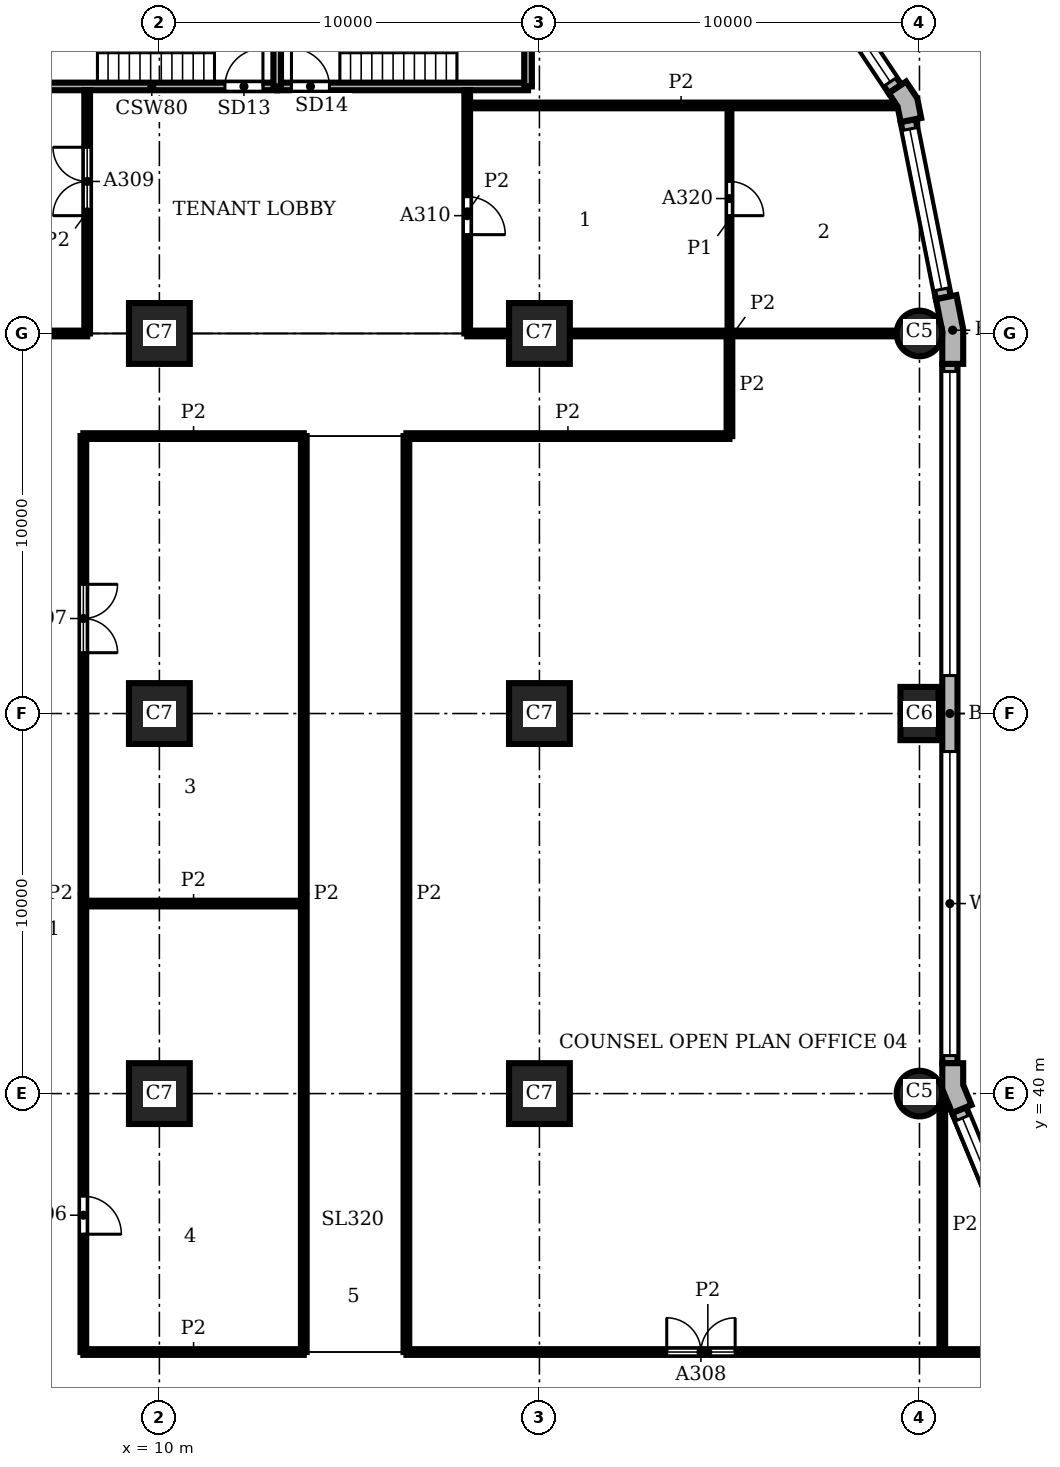
"""IFC4 building model, lengths in metres.
Left out: names, types, materials, properties, quantities, classifications, styles, units other than length and angle.
Written with IfcOpenShell. Run it as: python <this file> out.ifc"""

import sys

from ifc_helpers import new_model, si_unit, direction, frame, frame_2d, origin, origin_2d, place, context, subcontext, project, spatial, polyline, rectangle, circle, outline, extrude, element, fill, save


model = new_model("IFC4")
c1 = context("Model", 3, precision=1e-05, world=origin(), true_north=direction((0.0, 1.0)))
c2 = subcontext(c1, "Body", "Model", "MODEL_VIEW")
j1 = project(units=[si_unit("LENGTHUNIT", "METRE"), si_unit("PLANEANGLEUNIT", "RADIAN")], contexts=[c1])
p1 = place(None, origin())
s1 = spatial("IfcSite", under=j1, at=p1, CompositionType="ELEMENT")
p2 = place(p1, origin())
s2 = spatial("IfcBuilding", under=s1, at=p2, CompositionType="ELEMENT")
p3 = place(p2, frame((0.0, 0.0, 35.4)))
s3 = spatial("IfcBuildingStorey", under=s2, at=p3, CompositionType="ELEMENT", Elevation=35.4)
p4 = place(p3, frame((30.0, 40.0, 0.0), z_axis=(0.0, 0.0, 1.0), x_axis=(1.0, 0.0, 0.0)))
e1 = element("IfcColumn", 1, at=p4, inside=s3, PredefinedType="COLUMN", context=c2, shape_type="SweptSolid", body=[
    extrude(circle(Radius=0.6, at=origin_2d()), origin(), (0.0, 0.0, 1.0), 3.9),
])
p5 = place(p3, frame((30.0, 50.0, 0.0), z_axis=(0.0, 0.0, 1.0), x_axis=(0.0, 1.0, 0.0)))
e2 = element("IfcColumn", 2, at=p5, inside=s3, PredefinedType="COLUMN", context=c2, shape_type="SweptSolid", body=[
    extrude(rectangle(XDim=1.4, YDim=1.0, at=origin_2d()), origin(), (0.0, 0.0, 1.0), 3.9),
])
p6 = place(p3, frame((30.0, 60.0, 0.0), z_axis=(0.0, 0.0, 1.0), x_axis=(1.0, 0.0, 0.0)))
e3 = element("IfcColumn", 3, at=p6, inside=s3, PredefinedType="COLUMN", context=c2, shape_type="SweptSolid", body=[
    extrude(circle(Radius=0.6, at=origin_2d()), origin(), (0.0, 0.0, 1.0), 3.9),
])
for number, where, z_axis, x_axis in (
    (4, (10.0, 40.0, 0.0), (0.0, 0.0, 1.0), (1.0, 0.0, 0.0)),
    (5, (10.0, 50.0, 0.0), (0.0, 0.0, 1.0), (1.0, 0.0, 0.0)),
    (6, (10.0, 60.0, 0.0), (0.0, 0.0, 1.0), (1.0, 0.0, 0.0)),
    (7, (20.0, 40.0, 0.0), (0.0, 0.0, 1.0), (1.0, 0.0, 0.0)),
    (8, (20.0, 50.0, 0.0), (0.0, 0.0, 1.0), (1.0, 0.0, 0.0)),
    (9, (20.0, 60.0, 0.0), (0.0, 0.0, 1.0), (1.0, 0.0, 0.0)),
):
    element("IfcColumn", number, at=place(p3, frame(where, z_axis=z_axis, x_axis=x_axis)), inside=s3, PredefinedType="COLUMN", context=c2, shape_type="SweptSolid", body=[
        extrude(rectangle(XDim=1.6, YDim=1.6, at=origin_2d()), origin(), (0.0, 0.0, 1.0), 3.9),
    ])
p7 = place(p3, origin())
e10 = element("IfcWall", 10, at=p7, inside=s3, PredefinedType="SOLIDWALL", context=c2, shape_type="SweptSolid", body=[
    extrude(outline(polyline([(31.23, 39.644), (31.369, 39.701), (31.15, 40.229), (31.15, 40.8), (31.0, 40.8), (30.6, 40.8), (30.6, 40.119), (30.861, 39.49), (31.23, 39.644)])), origin(), (0.0, 0.0, 1.0), 3.9),
])
e11 = element("IfcWall", 11, at=p7, inside=s3, PredefinedType="SOLIDWALL", context=c2, shape_type="SweptSolid", body=[
    extrude(outline(polyline([(31.0, 59.2), (31.15, 59.2), (31.15, 60.113), (30.972, 61.009), (30.825, 60.98), (30.432, 60.902), (30.6, 60.059), (30.6, 59.2), (31.0, 59.2)])), origin(), (0.0, 0.0, 1.0), 3.9),
])
e12 = element("IfcWall", 12, at=p7, inside=s3, PredefinedType="SOLIDWALL", context=c2, shape_type="SweptSolid", body=[
    extrude(outline(polyline([(29.897, 65.641), (30.045, 65.67), (29.941, 66.189), (29.648, 66.629), (29.523, 66.545), (29.19, 66.323), (29.423, 65.974), (29.505, 65.563), (29.897, 65.641)])), origin(), (0.0, 0.0, 1.0), 3.9),
])
p8 = place(p3, frame((33.362, 33.974, 0.0), z_axis=(0.0, 0.0, 1.0), x_axis=(-0.382655745237, 0.923891000409, 0.0)))
e13 = element("IfcWall", 13, at=p8, inside=s3, PredefinedType="SOLIDWALL", context=c2, shape_type="SweptSolid", body=[
    extrude(rectangle(XDim=6.053, YDim=0.4, at=frame_2d((3.027, 0.0))), origin(), (0.0, 0.0, 1.0), 3.9),
])
p9 = place(p8, frame((0.227, 0.0, 0.9)))
e14 = element("IfcOpeningElement", 14, at=p9, cuts=e13, PredefinedType="OPENING", context=c2, shape_type="SweptSolid", body=[
    extrude(rectangle(XDim=5.6, YDim=2.35, at=frame_2d((2.8, 1.175))), frame((0.0, 0.21, 0.0), z_axis=(0.0, -1.0, 0.0), x_axis=(1.0, 0.0, 0.0)), (0.0, 0.0, 1.0), 0.42),
])
p10 = place(p3, frame((30.8, 40.8, 0.0), z_axis=(0.0, 0.0, 1.0), x_axis=(0.0, 1.0, 0.0)))
e15 = element("IfcWall", 15, at=p10, inside=s3, PredefinedType="SOLIDWALL", context=c2, shape_type="SweptSolid", body=[
    extrude(rectangle(XDim=18.4, YDim=0.4, at=frame_2d((9.2, 0.0))), origin(), (0.0, 0.0, 1.0), 3.9),
])
p11 = place(p10, frame((0.2, 0.0, 0.9)))
e16 = element("IfcOpeningElement", 16, at=p11, cuts=e15, PredefinedType="OPENING", context=c2, shape_type="SweptSolid", body=[
    extrude(rectangle(XDim=8.0, YDim=2.35, at=frame_2d((4.0, 1.175))), frame((0.0, 0.21, 0.0), z_axis=(0.0, -1.0, 0.0), x_axis=(1.0, 0.0, 0.0)), (0.0, 0.0, 1.0), 0.42),
])
p12 = place(p10, frame((10.2, 0.0, 0.9)))
e17 = element("IfcOpeningElement", 17, at=p12, cuts=e15, PredefinedType="OPENING", context=c2, shape_type="SweptSolid", body=[
    extrude(rectangle(XDim=8.0, YDim=2.35, at=frame_2d((4.0, 1.175))), frame((0.0, 0.21, 0.0), z_axis=(0.0, -1.0, 0.0), x_axis=(1.0, 0.0, 0.0)), (0.0, 0.0, 1.0), 0.42),
])
p13 = place(p3, frame((30.629, 60.941, 0.0), z_axis=(0.0, 0.0, 1.0), x_axis=(-0.195098533057, 0.98078364709, 0.0)))
e18 = element("IfcWall", 18, at=p13, inside=s3, PredefinedType="SOLIDWALL", context=c2, shape_type="SweptSolid", body=[
    extrude(rectangle(XDim=4.753, YDim=0.4, at=frame_2d((2.376, 0.0))), origin(), (0.0, 0.0, 1.0), 3.9),
])
p14 = place(p13, frame((0.226, 0.0, 0.9)))
e19 = element("IfcOpeningElement", 19, at=p14, cuts=e18, PredefinedType="OPENING", context=c2, shape_type="SweptSolid", body=[
    extrude(rectangle(XDim=4.3, YDim=2.35, at=frame_2d((2.15, 1.175))), frame((0.0, 0.21, 0.0), z_axis=(0.0, -1.0, 0.0), x_axis=(1.0, 0.0, 0.0)), (0.0, 0.0, 1.0), 0.42),
])
p15 = place(p3, frame((29.357, 66.434, 0.0), z_axis=(0.0, 0.0, 1.0), x_axis=(-0.555541552266, 0.831488775454, 0.0)))
e20 = element("IfcWall", 20, at=p15, inside=s3, PredefinedType="SOLIDWALL", context=c2, shape_type="SweptSolid", body=[
    extrude(rectangle(XDim=4.753, YDim=0.4, at=frame_2d((2.376, 0.0))), origin(), (0.0, 0.0, 1.0), 3.9),
])
p16 = place(p15, frame((0.226, 0.0, 0.9)))
e21 = element("IfcOpeningElement", 21, at=p16, cuts=e20, PredefinedType="OPENING", context=c2, shape_type="SweptSolid", body=[
    extrude(rectangle(XDim=4.3, YDim=2.35, at=frame_2d((2.15, 1.175))), frame((0.0, 0.21, 0.0), z_axis=(0.0, -1.0, 0.0), x_axis=(1.0, 0.0, 0.0)), (0.0, 0.0, 1.0), 0.42),
])
p17 = place(p3, frame((6.5, 66.5, 0.0), z_axis=(0.0, 0.0, 1.0), x_axis=(1.0, 0.0, 0.0)))
e22 = element("IfcWall", 22, at=p17, inside=s3, PredefinedType="SHEAR", context=c2, shape_type="SweptSolid", body=[
    extrude(rectangle(XDim=6.6, YDim=0.2, at=frame_2d((3.3, 0.0))), origin(), (0.0, 0.0, 1.0), 3.58),
])
p18 = place(p17, frame((5.225, 0.0, 0.0)))
e23 = element("IfcOpeningElement", 23, at=p18, cuts=e22, PredefinedType="OPENING", context=c2, shape_type="SweptSolid", body=[
    extrude(rectangle(XDim=1.0, YDim=2.1, at=frame_2d((0.5, 1.05))), frame((0.0, 0.11, 0.0), z_axis=(0.0, -1.0, 0.0), x_axis=(1.0, 0.0, 0.0)), (0.0, 0.0, 1.0), 0.22),
])
p19 = place(p3, frame((13.1, 66.5, 0.0), z_axis=(0.0, 0.0, 1.0), x_axis=(1.0, 0.0, 0.0)))
e24 = element("IfcWall", 24, at=p19, inside=s3, PredefinedType="SHEAR", context=c2, shape_type="SweptSolid", body=[
    extrude(rectangle(XDim=6.6, YDim=0.2, at=frame_2d((3.3, 0.0))), origin(), (0.0, 0.0, 1.0), 3.58),
])
p20 = place(p19, frame((0.375, 0.0, 0.0)))
e25 = element("IfcOpeningElement", 25, at=p20, cuts=e24, PredefinedType="OPENING", context=c2, shape_type="SweptSolid", body=[
    extrude(rectangle(XDim=1.0, YDim=2.1, at=frame_2d((0.5, 1.05))), frame((0.0, 0.11, 0.0), z_axis=(0.0, -1.0, 0.0), x_axis=(1.0, 0.0, 0.0)), (0.0, 0.0, 1.0), 0.22),
])
for number, where, z_axis, x_axis in (
    (26, (13.1, 66.5, 0.0), (0.0, 0.0, 1.0), (0.0, 1.0, 0.0)),
    (27, (19.7, 66.5, 0.0), (0.0, 0.0, 1.0), (0.0, 1.0, 0.0)),
):
    element("IfcWall", number, at=place(p3, frame(where, z_axis=z_axis, x_axis=x_axis)), inside=s3, PredefinedType="SHEAR", context=c2, shape_type="SweptSolid", body=[
        extrude(rectangle(XDim=3.3, YDim=0.2, at=frame_2d((1.65, 0.0))), origin(), (0.0, 0.0, 1.0), 3.58),
    ])
p21 = place(p3, frame((25.0, 60.0, 0.0), z_axis=(0.0, 0.0, 1.0), x_axis=(0.0, 1.0, 0.0)))
e28 = element("IfcWall", 28, at=p21, inside=s3, PredefinedType="PARTITIONING", context=c2, shape_type="SweptSolid", body=[
    extrude(rectangle(XDim=6.0, YDim=0.1, at=frame_2d((3.0, 0.0))), origin(), (0.0, 0.0, 1.0), 3.58),
])
p22 = place(p21, frame((3.1, 0.0, 0.0)))
e29 = element("IfcOpeningElement", 29, at=p22, cuts=e28, PredefinedType="OPENING", context=c2, shape_type="SweptSolid", body=[
    extrude(rectangle(XDim=0.9, YDim=2.1, at=frame_2d((0.45, 1.05))), frame((0.0, 0.06, 0.0), z_axis=(0.0, -1.0, 0.0), x_axis=(1.0, 0.0, 0.0)), (0.0, 0.0, 1.0), 0.12),
])
p23 = place(p3, frame((8.0, 33.2, 0.0), z_axis=(0.0, 0.0, 1.0), x_axis=(0.0, 1.0, 0.0)))
e30 = element("IfcWall", 30, at=p23, inside=s3, PredefinedType="PARTITIONING", context=c2, shape_type="SweptSolid", body=[
    extrude(rectangle(XDim=24.1, YDim=0.15, at=frame_2d((12.05, 0.0))), origin(), (0.0, 0.0, 1.0), 3.58),
])
p24 = place(p23, frame((3.1, 0.0, 0.0)))
e31 = element("IfcOpeningElement", 31, at=p24, cuts=e30, PredefinedType="OPENING", context=c2, shape_type="SweptSolid", body=[
    extrude(rectangle(XDim=1.0, YDim=2.1, at=frame_2d((0.5, 1.05))), frame((0.0, 0.085, 0.0), z_axis=(0.0, -1.0, 0.0), x_axis=(1.0, 0.0, 0.0)), (0.0, 0.0, 1.0), 0.17),
])
p25 = place(p23, frame((18.4, 0.0, 0.0)))
e32 = element("IfcOpeningElement", 32, at=p25, cuts=e30, PredefinedType="OPENING", context=c2, shape_type="SweptSolid", body=[
    extrude(rectangle(XDim=1.8, YDim=2.1, at=frame_2d((0.9, 1.05))), frame((0.0, 0.085, 0.0), z_axis=(0.0, -1.0, 0.0), x_axis=(1.0, 0.0, 0.0)), (0.0, 0.0, 1.0), 0.17),
])
p26 = place(p3, frame((8.1, 60.0, 0.0), z_axis=(0.0, 0.0, 1.0), x_axis=(0.0, 1.0, 0.0)))
e33 = element("IfcWall", 33, at=p26, inside=s3, PredefinedType="PARTITIONING", context=c2, shape_type="SweptSolid", body=[
    extrude(rectangle(XDim=6.4, YDim=0.15, at=frame_2d((3.2, 0.0))), origin(), (0.0, 0.0, 1.0), 3.58),
])
p27 = place(p26, frame((3.1, 0.0, 0.0)))
e34 = element("IfcOpeningElement", 34, at=p27, cuts=e33, PredefinedType="OPENING", context=c2, shape_type="SweptSolid", body=[
    extrude(rectangle(XDim=1.8, YDim=2.1, at=frame_2d((0.9, 1.05))), frame((0.0, 0.085, 0.0), z_axis=(0.0, -1.0, 0.0), x_axis=(1.0, 0.0, 0.0)), (0.0, 0.0, 1.0), 0.17),
])
for number, where, z_axis, x_axis in (
    (35, (13.8, 33.2, 0.0), (0.0, 0.0, 1.0), (0.0, 1.0, 0.0)),
    (36, (16.5, 33.2, 0.0), (0.0, 0.0, 1.0), (0.0, 1.0, 0.0)),
):
    element("IfcWall", number, at=place(p3, frame(where, z_axis=z_axis, x_axis=x_axis)), inside=s3, PredefinedType="PARTITIONING", context=c2, shape_type="SweptSolid", body=[
        extrude(rectangle(XDim=24.1, YDim=0.15, at=frame_2d((12.05, 0.0))), origin(), (0.0, 0.0, 1.0), 3.58),
    ])
p28 = place(p3, frame((18.1, 60.0, 0.0), z_axis=(0.0, 0.0, 1.0), x_axis=(0.0, 1.0, 0.0)))
e37 = element("IfcWall", 37, at=p28, inside=s3, PredefinedType="PARTITIONING", context=c2, shape_type="SweptSolid", body=[
    extrude(rectangle(XDim=6.4, YDim=0.15, at=frame_2d((3.2, 0.0))), origin(), (0.0, 0.0, 1.0), 3.58),
])
p29 = place(p28, frame((2.6, 0.0, 0.0)))
e38 = element("IfcOpeningElement", 38, at=p29, cuts=e37, PredefinedType="OPENING", context=c2, shape_type="SweptSolid", body=[
    extrude(rectangle(XDim=1.0, YDim=2.1, at=frame_2d((0.5, 1.05))), frame((0.0, 0.085, 0.0), z_axis=(0.0, -1.0, 0.0), x_axis=(1.0, 0.0, 0.0)), (0.0, 0.0, 1.0), 0.17),
])
p30 = place(p3, frame((25.0, 57.3, 0.0), z_axis=(0.0, 0.0, 1.0), x_axis=(0.0, 1.0, 0.0)))
e39 = element("IfcWall", 39, at=p30, inside=s3, PredefinedType="PARTITIONING", context=c2, shape_type="SweptSolid", body=[
    extrude(rectangle(XDim=2.7, YDim=0.15, at=frame_2d((1.35, 0.0))), origin(), (0.0, 0.0, 1.0), 3.58),
])
p31 = place(p3, frame((30.6, 33.2, 0.0), z_axis=(0.0, 0.0, 1.0), x_axis=(0.0, 1.0, 0.0)))
e40 = element("IfcWall", 40, at=p31, inside=s3, PredefinedType="PARTITIONING", context=c2, shape_type="SweptSolid", body=[
    extrude(rectangle(XDim=6.699, YDim=0.15, at=frame_2d((3.35, 0.0))), origin(), (0.0, 0.0, 1.0), 3.58),
])
p32 = place(p3, frame((8.0, 33.2, 0.0), z_axis=(0.0, 0.0, 1.0), x_axis=(1.0, 0.0, 0.0)))
e41 = element("IfcWall", 41, at=p32, inside=s3, PredefinedType="PARTITIONING", context=c2, shape_type="SweptSolid", body=[
    extrude(rectangle(XDim=5.8, YDim=0.15, at=frame_2d((2.9, 0.0))), origin(), (0.0, 0.0, 1.0), 3.58),
])
p33 = place(p3, frame((16.5, 33.2, 0.0), z_axis=(0.0, 0.0, 1.0), x_axis=(1.0, 0.0, 0.0)))
e42 = element("IfcWall", 42, at=p33, inside=s3, PredefinedType="PARTITIONING", context=c2, shape_type="SweptSolid", body=[
    extrude(rectangle(XDim=15.862, YDim=0.15, at=frame_2d((7.931, 0.0))), origin(), (0.0, 0.0, 1.0), 3.58),
])
p34 = place(p33, frame((6.85, 0.0, 0.0)))
e43 = element("IfcOpeningElement", 43, at=p34, cuts=e42, PredefinedType="OPENING", context=c2, shape_type="SweptSolid", body=[
    extrude(rectangle(XDim=1.8, YDim=2.1, at=frame_2d((0.9, 1.05))), frame((0.0, 0.085, 0.0), z_axis=(0.0, -1.0, 0.0), x_axis=(1.0, 0.0, 0.0)), (0.0, 0.0, 1.0), 0.17),
])
for number, where, z_axis, x_axis in (
    (44, (8.0, 45.0, 0.0), (0.0, 0.0, 1.0), (1.0, 0.0, 0.0)),
    (45, (8.0, 57.3, 0.0), (0.0, 0.0, 1.0), (1.0, 0.0, 0.0)),
):
    element("IfcWall", number, at=place(p3, frame(where, z_axis=z_axis, x_axis=x_axis)), inside=s3, PredefinedType="PARTITIONING", context=c2, shape_type="SweptSolid", body=[
        extrude(rectangle(XDim=5.8, YDim=0.15, at=frame_2d((2.9, 0.0))), origin(), (0.0, 0.0, 1.0), 3.58),
    ])
p35 = place(p3, frame((16.5, 57.3, 0.0), z_axis=(0.0, 0.0, 1.0), x_axis=(1.0, 0.0, 0.0)))
e46 = element("IfcWall", 46, at=p35, inside=s3, PredefinedType="PARTITIONING", context=c2, shape_type="SweptSolid", body=[
    extrude(rectangle(XDim=8.5, YDim=0.15, at=frame_2d((4.25, 0.0))), origin(), (0.0, 0.0, 1.0), 3.58),
])
p36 = place(p3, frame((0.6, 60.0, 0.0), z_axis=(0.0, 0.0, 1.0), x_axis=(1.0, 0.0, 0.0)))
e47 = element("IfcWall", 47, at=p36, inside=s3, PredefinedType="PARTITIONING", context=c2, shape_type="SweptSolid", body=[
    extrude(rectangle(XDim=7.5, YDim=0.15, at=frame_2d((3.75, 0.0))), origin(), (0.0, 0.0, 1.0), 3.58),
])
p37 = place(p3, frame((18.1, 60.0, 0.0), z_axis=(0.0, 0.0, 1.0), x_axis=(1.0, 0.0, 0.0)))
e48 = element("IfcWall", 48, at=p37, inside=s3, PredefinedType="PARTITIONING", context=c2, shape_type="SweptSolid", body=[
    extrude(rectangle(XDim=1.1, YDim=0.15, at=frame_2d((0.55, 0.0))), origin(), (0.0, 0.0, 1.0), 3.58),
])
p38 = place(p3, frame((20.8, 60.0, 0.0), z_axis=(0.0, 0.0, 1.0), x_axis=(1.0, 0.0, 0.0)))
e49 = element("IfcWall", 49, at=p38, inside=s3, PredefinedType="PARTITIONING", context=c2, shape_type="SweptSolid", body=[
    extrude(rectangle(XDim=8.6, YDim=0.15, at=frame_2d((4.3, 0.0))), origin(), (0.0, 0.0, 1.0), 3.58),
])
p39 = place(p3, frame((18.1, 66.0, 0.0), z_axis=(0.0, 0.0, 1.0), x_axis=(1.0, 0.0, 0.0)))
e50 = element("IfcWall", 50, at=p39, inside=s3, PredefinedType="PARTITIONING", context=c2, shape_type="SweptSolid", body=[
    extrude(rectangle(XDim=11.256, YDim=0.15, at=frame_2d((5.628, 0.0))), origin(), (0.0, 0.0, 1.0), 3.58),
])
p40 = place(p9, origin())
e51 = element("IfcWindow", 51, at=p40, inside=s3, PartitioningType="SINGLE_PANEL", PredefinedType="WINDOW", context=c2, shape_type="SweptSolid", body=[
    extrude(rectangle(XDim=5.6, YDim=2.35, at=frame_2d((2.8, 1.175))), frame((0.0, 0.16, 0.0), z_axis=(0.0, -1.0, 0.0), x_axis=(1.0, 0.0, 0.0)), (0.0, 0.0, 1.0), 0.06),
])
fill(e14, e51)
p41 = place(p11, origin())
e52 = element("IfcWindow", 52, at=p41, inside=s3, PartitioningType="SINGLE_PANEL", PredefinedType="WINDOW", context=c2, shape_type="SweptSolid", body=[
    extrude(rectangle(XDim=8.0, YDim=2.35, at=frame_2d((4.0, 1.175))), frame((0.0, 0.16, 0.0), z_axis=(0.0, -1.0, 0.0), x_axis=(1.0, 0.0, 0.0)), (0.0, 0.0, 1.0), 0.06),
])
fill(e16, e52)
p42 = place(p12, origin())
e53 = element("IfcWindow", 53, at=p42, inside=s3, PartitioningType="SINGLE_PANEL", PredefinedType="WINDOW", context=c2, shape_type="SweptSolid", body=[
    extrude(rectangle(XDim=8.0, YDim=2.35, at=frame_2d((4.0, 1.175))), frame((0.0, 0.16, 0.0), z_axis=(0.0, -1.0, 0.0), x_axis=(1.0, 0.0, 0.0)), (0.0, 0.0, 1.0), 0.06),
])
fill(e17, e53)
p43 = place(p14, origin())
e54 = element("IfcWindow", 54, at=p43, inside=s3, PartitioningType="SINGLE_PANEL", PredefinedType="WINDOW", context=c2, shape_type="SweptSolid", body=[
    extrude(rectangle(XDim=4.3, YDim=2.35, at=frame_2d((2.15, 1.175))), frame((0.0, 0.16, 0.0), z_axis=(0.0, -1.0, 0.0), x_axis=(1.0, 0.0, 0.0)), (0.0, 0.0, 1.0), 0.06),
])
fill(e19, e54)
p44 = place(p16, origin())
e55 = element("IfcWindow", 55, at=p44, inside=s3, PartitioningType="SINGLE_PANEL", PredefinedType="WINDOW", context=c2, shape_type="SweptSolid", body=[
    extrude(rectangle(XDim=4.3, YDim=2.35, at=frame_2d((2.15, 1.175))), frame((0.0, 0.16, 0.0), z_axis=(0.0, -1.0, 0.0), x_axis=(1.0, 0.0, 0.0)), (0.0, 0.0, 1.0), 0.06),
])
fill(e21, e55)
p45 = place(p18, origin())
e56 = element("IfcDoor", 56, at=p45, inside=s3, OperationType="SINGLE_SWING_RIGHT", PredefinedType="DOOR", context=c2, shape_type="SweptSolid", body=[
    extrude(rectangle(XDim=1.0, YDim=2.1, at=frame_2d((0.5, 1.05))), frame((0.0, 0.025, 0.0), z_axis=(0.0, -1.0, 0.0), x_axis=(1.0, 0.0, 0.0)), (0.0, 0.0, 1.0), 0.05),
])
fill(e23, e56)
p46 = place(p20, origin())
e57 = element("IfcDoor", 57, at=p46, inside=s3, OperationType="SINGLE_SWING_LEFT", PredefinedType="DOOR", context=c2, shape_type="SweptSolid", body=[
    extrude(rectangle(XDim=1.0, YDim=2.1, at=frame_2d((0.5, 1.05))), frame((0.0, 0.025, 0.0), z_axis=(0.0, -1.0, 0.0), x_axis=(1.0, 0.0, 0.0)), (0.0, 0.0, 1.0), 0.05),
])
fill(e25, e57)
p47 = place(p24, frame((1.0, 0.0, 0.0), z_axis=(0.0, 0.0, 1.0), x_axis=(-1.0, 0.0, 0.0)))
e58 = element("IfcDoor", 58, at=p47, inside=s3, OperationType="SINGLE_SWING_RIGHT", PredefinedType="DOOR", context=c2, shape_type="SweptSolid", body=[
    extrude(rectangle(XDim=1.0, YDim=2.1, at=frame_2d((0.5, 1.05))), frame((0.0, 0.025, 0.0), z_axis=(0.0, -1.0, 0.0), x_axis=(1.0, 0.0, 0.0)), (0.0, 0.0, 1.0), 0.05),
])
fill(e31, e58)
p48 = place(p25, frame((1.8, 0.0, 0.0), z_axis=(0.0, 0.0, 1.0), x_axis=(-1.0, 0.0, 0.0)))
e59 = element("IfcDoor", 59, at=p48, inside=s3, OperationType="DOUBLE_DOOR_SINGLE_SWING", PredefinedType="DOOR", context=c2, shape_type="SweptSolid", body=[
    extrude(rectangle(XDim=1.8, YDim=2.1, at=frame_2d((0.9, 1.05))), frame((0.0, 0.025, 0.0), z_axis=(0.0, -1.0, 0.0), x_axis=(1.0, 0.0, 0.0)), (0.0, 0.0, 1.0), 0.05),
])
fill(e32, e59)
p49 = place(p34, origin())
e60 = element("IfcDoor", 60, at=p49, inside=s3, OperationType="DOUBLE_DOOR_SINGLE_SWING", PredefinedType="DOOR", context=c2, shape_type="SweptSolid", body=[
    extrude(rectangle(XDim=1.8, YDim=2.1, at=frame_2d((0.9, 1.05))), frame((0.0, 0.025, 0.0), z_axis=(0.0, -1.0, 0.0), x_axis=(1.0, 0.0, 0.0)), (0.0, 0.0, 1.0), 0.05),
])
fill(e43, e60)
p50 = place(p27, origin())
e61 = element("IfcDoor", 61, at=p50, inside=s3, OperationType="DOUBLE_DOOR_SINGLE_SWING", PredefinedType="DOOR", context=c2, shape_type="SweptSolid", body=[
    extrude(rectangle(XDim=1.8, YDim=2.1, at=frame_2d((0.9, 1.05))), frame((0.0, 0.025, 0.0), z_axis=(0.0, -1.0, 0.0), x_axis=(1.0, 0.0, 0.0)), (0.0, 0.0, 1.0), 0.05),
])
fill(e34, e61)
p51 = place(p29, frame((1.0, 0.0, 0.0), z_axis=(0.0, 0.0, 1.0), x_axis=(-1.0, 0.0, 0.0)))
e62 = element("IfcDoor", 62, at=p51, inside=s3, OperationType="SINGLE_SWING_RIGHT", PredefinedType="DOOR", context=c2, shape_type="SweptSolid", body=[
    extrude(rectangle(XDim=1.0, YDim=2.1, at=frame_2d((0.5, 1.05))), frame((0.0, 0.025, 0.0), z_axis=(0.0, -1.0, 0.0), x_axis=(1.0, 0.0, 0.0)), (0.0, 0.0, 1.0), 0.05),
])
fill(e38, e62)
p52 = place(p22, frame((0.9, 0.0, 0.0), z_axis=(0.0, 0.0, 1.0), x_axis=(-1.0, 0.0, 0.0)))
e63 = element("IfcDoor", 63, at=p52, inside=s3, OperationType="SINGLE_SWING_RIGHT", PredefinedType="DOOR", context=c2, shape_type="SweptSolid", body=[
    extrude(rectangle(XDim=0.9, YDim=2.1, at=frame_2d((0.45, 1.05))), frame((0.0, 0.025, 0.0), z_axis=(0.0, -1.0, 0.0), x_axis=(1.0, 0.0, 0.0)), (0.0, 0.0, 1.0), 0.05),
])
fill(e29, e63)
save(model, sys.argv[1])
